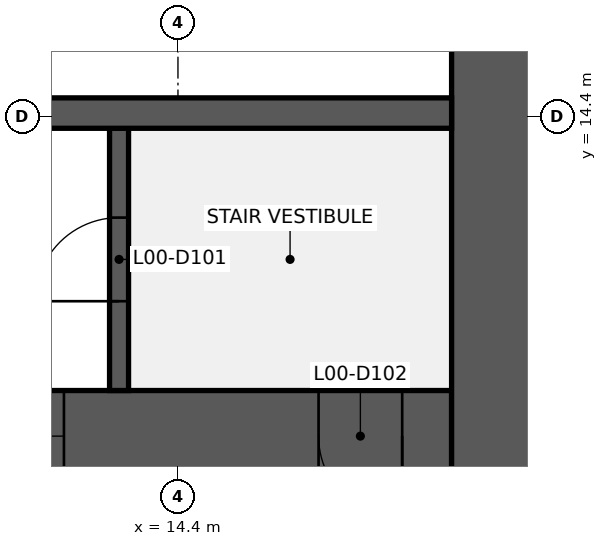
"""IFC4 building model, lengths in metres.
Left out: names, types, materials, properties, quantities, classifications, styles, units other than length and angle.
Written with IfcOpenShell. Run it as: python <this file> out.ifc"""

import sys

from ifc_helpers import new_model, si_unit, direction, frame, frame_2d, origin, place, context, subcontext, project, spatial, rectangle, extrude, element, fill, save


model = new_model("IFC4")
c1 = context("Model", 3, precision=1e-05, world=origin(), true_north=direction((0.0, 1.0)))
c2 = subcontext(c1, "Body", "Model", "MODEL_VIEW")
j1 = project(units=[si_unit("LENGTHUNIT", "METRE"), si_unit("PLANEANGLEUNIT", "RADIAN")], contexts=[c1])
p1 = place(None, origin())
s1 = spatial("IfcSite", under=j1, at=p1, CompositionType="ELEMENT")
p2 = place(p1, origin())
s2 = spatial("IfcBuilding", under=s1, at=p2, CompositionType="ELEMENT")
p3 = place(p2, origin())
s3 = spatial("IfcBuildingStorey", under=s2, at=p3, CompositionType="ELEMENT", Elevation=0.0)
p4 = place(p3, frame((18.0, 10.2, -2.0), z_axis=(0.0, 0.0, 1.0), x_axis=(-1.0, 0.0, 0.0)))
e1 = element("IfcWall", 1, at=p4, inside=s3, PredefinedType="SHEAR", context=c2, shape_type="SweptSolid", body=[
    extrude(rectangle(XDim=16.8, YDim=1.2, at=frame_2d((8.4, 0.0))), origin(), (0.0, 0.0, 1.0), 14.3),
])
p5 = place(p4, frame((0.65, 0.0, 2.0)))
e2 = element("IfcOpeningElement", 2, at=p5, cuts=e1, PredefinedType="OPENING", context=c2, shape_type="SweptSolid", body=[
    extrude(rectangle(XDim=1.1, YDim=2.1, at=frame_2d((0.55, 1.05))), frame((0.0, 0.61, 0.0), z_axis=(0.0, -1.0, 0.0), x_axis=(1.0, 0.0, 0.0)), (0.0, 0.0, 1.0), 1.22),
])
p6 = place(p4, frame((9.9, 0.0, 2.9)))
e3 = element("IfcOpeningElement", 3, at=p6, cuts=e1, PredefinedType="OPENING", context=c2, shape_type="SweptSolid", body=[
    extrude(rectangle(XDim=1.8, YDim=1.5, at=frame_2d((0.9, 0.75))), frame((0.0, 0.61, 0.0), z_axis=(0.0, -1.0, 0.0), x_axis=(1.0, 0.0, 0.0)), (0.0, 0.0, 1.0), 1.22),
])
p7 = place(p4, frame((5.1, 0.0, 2.9)))
e4 = element("IfcOpeningElement", 4, at=p7, cuts=e1, PredefinedType="OPENING", context=c2, shape_type="SweptSolid", body=[
    extrude(rectangle(XDim=1.8, YDim=1.5, at=frame_2d((0.9, 0.75))), frame((0.0, 0.61, 0.0), z_axis=(0.0, -1.0, 0.0), x_axis=(1.0, 0.0, 0.0)), (0.0, 0.0, 1.0), 1.22),
])
p8 = place(p3, frame((18.6, 38.4, -2.0), z_axis=(0.0, 0.0, 1.0), x_axis=(0.0, -1.0, 0.0)))
e5 = element("IfcWall", 5, at=p8, inside=s3, PredefinedType="SHEAR", context=c2, shape_type="SweptSolid", body=[
    extrude(rectangle(XDim=28.8, YDim=1.2, at=frame_2d((14.4, 0.0))), origin(), (0.0, 0.0, 1.0), 14.3),
])
p9 = place(p8, frame((18.3, 0.0, 2.0)))
e6 = element("IfcOpeningElement", 6, at=p9, cuts=e5, PredefinedType="OPENING", context=c2, shape_type="SweptSolid", body=[
    extrude(rectangle(XDim=1.8, YDim=2.1, at=frame_2d((0.9, 1.05))), frame((0.0, 0.61, 0.0), z_axis=(0.0, -1.0, 0.0), x_axis=(1.0, 0.0, 0.0)), (0.0, 0.0, 1.0), 1.22),
])
p10 = place(p8, frame((8.7, 0.0, 2.0)))
e7 = element("IfcOpeningElement", 7, at=p10, cuts=e5, PredefinedType="OPENING", context=c2, shape_type="SweptSolid", body=[
    extrude(rectangle(XDim=1.8, YDim=2.1, at=frame_2d((0.9, 1.05))), frame((0.0, 0.61, 0.0), z_axis=(0.0, -1.0, 0.0), x_axis=(1.0, 0.0, 0.0)), (0.0, 0.0, 1.0), 1.22),
])
p11 = place(p3, frame((13.625, 10.8, -2.0), z_axis=(0.0, 0.0, 1.0), x_axis=(0.0, 1.0, 0.0)))
e8 = element("IfcWall", 8, at=p11, inside=s3, PredefinedType="SHEAR", context=c2, shape_type="SweptSolid", body=[
    extrude(rectangle(XDim=3.45, YDim=0.25, at=frame_2d((1.725, 0.0))), origin(), (0.0, 0.0, 1.0), 14.3),
])
p12 = place(p11, frame((1.175, 0.0, 2.0)))
e9 = element("IfcOpeningElement", 9, at=p12, cuts=e8, PredefinedType="OPENING", context=c2, shape_type="SweptSolid", body=[
    extrude(rectangle(XDim=1.1, YDim=2.1, at=frame_2d((0.55, 1.05))), frame((0.0, 0.135, 0.0), z_axis=(0.0, -1.0, 0.0), x_axis=(1.0, 0.0, 0.0)), (0.0, 0.0, 1.0), 0.27),
])
p13 = place(p3, frame((1.2, 14.45, -2.0), z_axis=(0.0, 0.0, 1.0), x_axis=(1.0, 0.0, 0.0)))
e10 = element("IfcWall", 10, at=p13, inside=s3, PredefinedType="SHEAR", context=c2, shape_type="SweptSolid", body=[
    extrude(rectangle(XDim=16.8, YDim=0.4, at=frame_2d((8.4, 0.0))), origin(), (0.0, 0.0, 1.0), 14.3),
])
p14 = place(p12, origin())
e11 = element("IfcDoor", 11, at=p14, inside=s3, OperationType="SINGLE_SWING_LEFT", PredefinedType="DOOR", context=c2, shape_type="SweptSolid", body=[
    extrude(rectangle(XDim=1.1, YDim=2.1, at=frame_2d((0.55, 1.05))), frame((0.0, 0.025, 0.0), z_axis=(0.0, -1.0, 0.0), x_axis=(1.0, 0.0, 0.0)), (0.0, 0.0, 1.0), 0.05),
])
fill(e9, e11)
p15 = place(p5, origin())
e12 = element("IfcDoor", 12, at=p15, inside=s3, OperationType="SINGLE_SWING_LEFT", PredefinedType="DOOR", context=c2, shape_type="SweptSolid", body=[
    extrude(rectangle(XDim=1.1, YDim=2.1, at=frame_2d((0.55, 1.05))), frame((0.0, 0.025, 0.0), z_axis=(0.0, -1.0, 0.0), x_axis=(1.0, 0.0, 0.0)), (0.0, 0.0, 1.0), 0.05),
])
fill(e2, e12)
p16 = place(p7, origin())
e13 = element("IfcWindow", 13, at=p16, inside=s3, PartitioningType="SINGLE_PANEL", PredefinedType="WINDOW", context=c2, shape_type="SweptSolid", body=[
    extrude(rectangle(XDim=1.8, YDim=1.5, at=frame_2d((0.9, 0.75))), frame((0.0, 0.03, 0.0), z_axis=(0.0, -1.0, 0.0), x_axis=(1.0, 0.0, 0.0)), (0.0, 0.0, 1.0), 0.06),
])
fill(e4, e13)
save(model, sys.argv[1])
